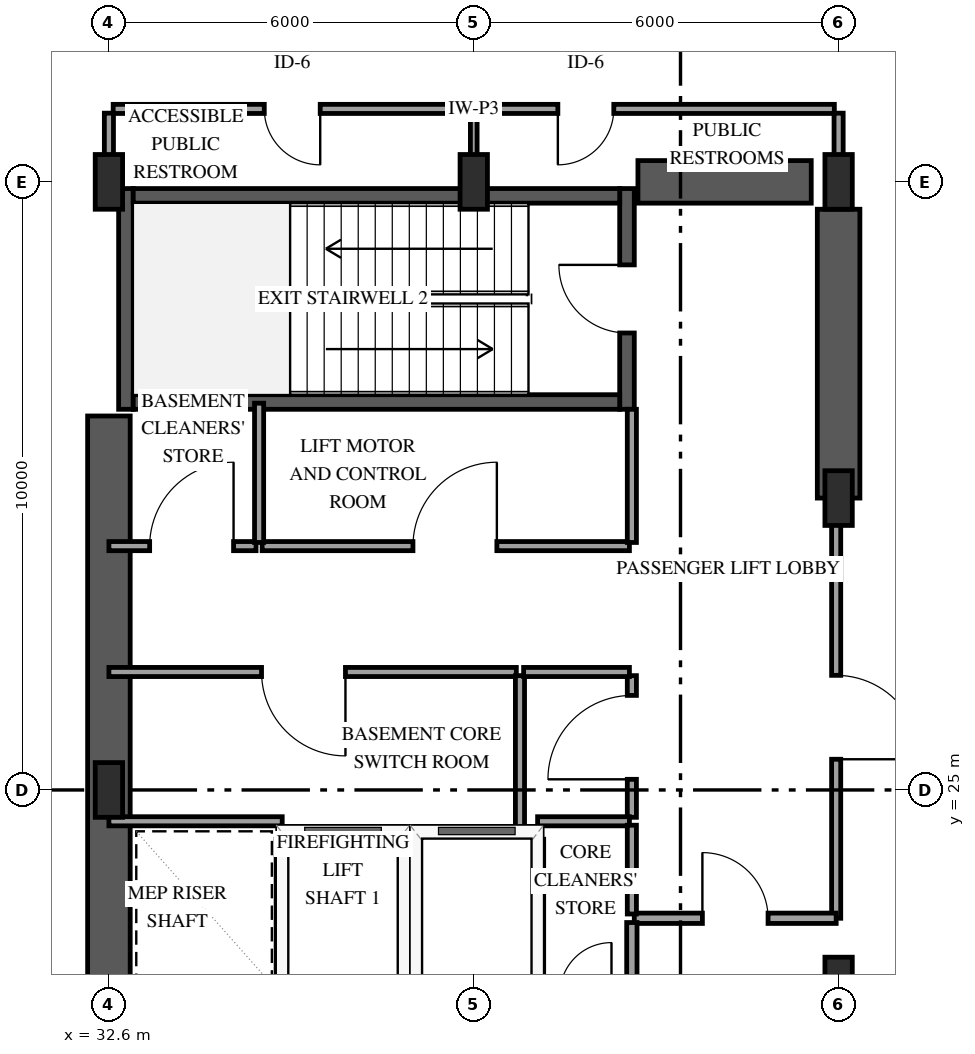
"""IFC4 building model, lengths in metres.
Left out: names, types, materials, properties, quantities, classifications, styles, units other than length and angle.
Written with IfcOpenShell. Run it as: python <this file> out.ifc"""

import sys

from ifc_helpers import new_model, si_unit, direction, frame, frame_2d, origin, origin_2d, place, context, subcontext, project, spatial, rectangle, extrude, element, fill, save


model = new_model("IFC4")
c1 = context("Model", 3, precision=1e-05, world=origin(), true_north=direction((0.0, 1.0)))
c2 = subcontext(c1, "Body", "Model", "MODEL_VIEW")
j1 = project(units=[si_unit("LENGTHUNIT", "METRE"), si_unit("PLANEANGLEUNIT", "RADIAN")], contexts=[c1])
p1 = place(None, origin())
s1 = spatial("IfcSite", under=j1, at=p1, CompositionType="ELEMENT")
p2 = place(p1, origin())
s2 = spatial("IfcBuilding", under=s1, at=p2, CompositionType="ELEMENT")
p3 = place(p2, frame((0.0, 0.0, -5.4)))
s3 = spatial("IfcBuildingStorey", under=s2, at=p3, CompositionType="ELEMENT", Elevation=-5.4)
p4 = place(p3, frame((32.88, 31.26, 0.0), z_axis=(0.0, 0.0, 1.0), x_axis=(0.0, 1.0, 0.0)))
e1 = element("IfcWall", 1, at=p4, inside=s3, PredefinedType="SHEAR", context=c2, shape_type="SweptSolid", body=[
    extrude(rectangle(XDim=3.63, YDim=0.24, at=frame_2d((1.815, 0.0))), origin(), (0.0, 0.0, 1.0), 5.4),
])
p5 = place(p3, frame((41.12, 31.26, 0.0), z_axis=(0.0, 0.0, 1.0), x_axis=(0.0, 1.0, 0.0)))
e2 = element("IfcWall", 2, at=p5, inside=s3, PredefinedType="SHEAR", context=c2, shape_type="SweptSolid", body=[
    extrude(rectangle(XDim=3.63, YDim=0.24, at=frame_2d((1.815, 0.0))), origin(), (0.0, 0.0, 1.0), 5.4),
])
p6 = place(p5, frame((1.255, 0.0, 0.0)))
e3 = element("IfcOpeningElement", 3, at=p6, cuts=e2, PredefinedType="OPENING", context=c2, shape_type="SweptSolid", body=[
    extrude(rectangle(XDim=1.12, YDim=2.15, at=frame_2d((0.56, 1.075))), frame((0.0, 0.13, 0.0), z_axis=(0.0, -1.0, 0.0), x_axis=(1.0, 0.0, 0.0)), (0.0, 0.0, 1.0), 0.26),
])
for number, where, z_axis, x_axis in (
    (4, (33.0, 31.38, 0.0), (0.0, 0.0, 1.0), (1.0, 0.0, 0.0)),
    (5, (33.0, 34.77, 0.0), (0.0, 0.0, 1.0), (1.0, 0.0, 0.0)),
):
    element("IfcWall", number, at=place(p3, frame(where, z_axis=z_axis, x_axis=x_axis)), inside=s3, PredefinedType="SHEAR", context=c2, shape_type="SweptSolid", body=[
        extrude(rectangle(XDim=8.0, YDim=0.24, at=frame_2d((4.0, 0.0))), origin(), (0.0, 0.0, 1.0), 5.4),
    ])
p7 = place(p3, frame((32.6, 18.85, 0.0), z_axis=(0.0, 0.0, 1.0), x_axis=(0.0, 1.0, 0.0)))
e6 = element("IfcWall", 6, at=p7, inside=s3, PredefinedType="SHEAR", context=c2, shape_type="SweptSolid", body=[
    extrude(rectangle(XDim=12.3, YDim=0.7, at=frame_2d((6.15, 0.0))), origin(), (0.0, 0.0, 1.0), 5.4),
])
p8 = place(p3, frame((41.3, 35.0, 0.0), z_axis=(0.0, 0.0, 1.0), x_axis=(1.0, 0.0, 0.0)))
e7 = element("IfcWall", 7, at=p8, inside=s3, PredefinedType="SHEAR", context=c2, shape_type="SweptSolid", body=[
    extrude(rectangle(XDim=2.85, YDim=0.7, at=frame_2d((1.425, 0.0))), origin(), (0.0, 0.0, 1.0), 5.4),
])
p9 = place(p3, frame((44.6, 29.8, 0.0), z_axis=(0.0, 0.0, 1.0), x_axis=(0.0, 1.0, 0.0)))
e8 = element("IfcWall", 8, at=p9, inside=s3, PredefinedType="SHEAR", context=c2, shape_type="SweptSolid", body=[
    extrude(rectangle(XDim=4.75, YDim=0.7, at=frame_2d((2.375, 0.0))), origin(), (0.0, 0.0, 1.0), 5.4),
])
for number, where, z_axis, x_axis in (
    (9, (32.6, 25.0, 0.0), (0.0, 0.0, 1.0), (1.0, 0.0, 0.0)),
    (10, (32.6, 35.0, 0.0), (0.0, 0.0, 1.0), (1.0, 0.0, 0.0)),
    (11, (38.6, 35.0, 0.0), (0.0, 0.0, 1.0), (1.0, 0.0, 0.0)),
    (12, (44.6, 21.8, 0.0), (0.0, 0.0, 1.0), (1.0, 0.0, 0.0)),
    (13, (44.6, 29.8, 0.0), (0.0, 0.0, 1.0), (1.0, 0.0, 0.0)),
    (14, (44.6, 35.0, 0.0), (0.0, 0.0, 1.0), (1.0, 0.0, 0.0)),
):
    element("IfcColumn", number, at=place(p3, frame(where, z_axis=z_axis, x_axis=x_axis)), inside=s3, PredefinedType="PILASTER", context=c2, shape_type="SweptSolid", body=[
        extrude(rectangle(XDim=0.45, YDim=0.9, at=origin_2d()), origin(), (0.0, 0.0, 1.0), 5.4),
    ])
p10 = place(p3, frame((35.45, 24.3, 0.0), z_axis=(0.0, 0.0, 1.0), x_axis=(1.0, 0.0, 0.0)))
e15 = element("IfcWall", 15, at=p10, inside=s3, PredefinedType="SOLIDWALL", context=c2, shape_type="SweptSolid", body=[
    extrude(rectangle(XDim=2.0, YDim=0.2, at=frame_2d((1.0, 0.0))), origin(), (0.0, 0.0, 1.0), 5.08),
])
for number, where, z_axis, x_axis in (
    (16, (35.45, 21.81, 0.0), (0.0, 0.0, 1.0), (0.0, 1.0, 0.0)),
    (17, (37.45, 21.81, 0.0), (0.0, 0.0, 1.0), (0.0, 1.0, 0.0)),
):
    element("IfcWall", number, at=place(p3, frame(where, z_axis=z_axis, x_axis=x_axis)), inside=s3, PredefinedType="SOLIDWALL", context=c2, shape_type="SweptSolid", body=[
        extrude(rectangle(XDim=2.38, YDim=0.2, at=frame_2d((1.19, 0.0))), origin(), (0.0, 0.0, 1.0), 5.08),
    ])
p11 = place(p3, frame((37.65, 24.3, 0.0), z_axis=(0.0, 0.0, 1.0), x_axis=(1.0, 0.0, 0.0)))
e18 = element("IfcWall", 18, at=p11, inside=s3, PredefinedType="SOLIDWALL", context=c2, shape_type="SweptSolid", body=[
    extrude(rectangle(XDim=2.0, YDim=0.2, at=frame_2d((1.0, 0.0))), origin(), (0.0, 0.0, 1.0), 5.08),
])
p12 = place(p3, frame((39.65, 21.81, 0.0), z_axis=(0.0, 0.0, 1.0), x_axis=(0.0, 1.0, 0.0)))
e19 = element("IfcWall", 19, at=p12, inside=s3, PredefinedType="SOLIDWALL", context=c2, shape_type="SweptSolid", body=[
    extrude(rectangle(XDim=2.38, YDim=0.2, at=frame_2d((1.19, 0.0))), origin(), (0.0, 0.0, 1.0), 5.08),
])
p13 = place(p3, frame((44.56, 29.8, 0.0), z_axis=(0.0, 0.0, 1.0), x_axis=(0.0, -1.0, 0.0)))
e20 = element("IfcWall", 20, at=p13, inside=s3, PredefinedType="PARTITIONING", context=c2, shape_type="SweptSolid", body=[
    extrude(rectangle(XDim=6.91, YDim=0.15, at=frame_2d((3.455, 0.0))), origin(), (0.0, 0.0, 1.0), 4.12),
])
p14 = place(p13, frame((2.915, 0.0, 0.0)))
e21 = element("IfcOpeningElement", 21, at=p14, cuts=e20, PredefinedType="OPENING", context=c2, shape_type="SweptSolid", body=[
    extrude(rectangle(XDim=1.38, YDim=2.2, at=frame_2d((0.69, 1.1))), frame((0.0, 0.085, 0.0), z_axis=(0.0, -1.0, 0.0), x_axis=(1.0, 0.0, 0.0)), (0.0, 0.0, 1.0), 0.17),
])
p15 = place(p3, frame((39.3, 26.94, 0.0), z_axis=(0.0, 0.0, 1.0), x_axis=(-1.0, 0.0, 0.0)))
e22 = element("IfcWall", 22, at=p15, inside=s3, PredefinedType="PARTITIONING", context=c2, shape_type="SweptSolid", body=[
    extrude(rectangle(XDim=6.7, YDim=0.15, at=frame_2d((3.35, 0.0))), origin(), (0.0, 0.0, 1.0), 5.08),
])
p16 = place(p15, frame((2.81, 0.0, 0.0)))
e23 = element("IfcOpeningElement", 23, at=p16, cuts=e22, PredefinedType="OPENING", context=c2, shape_type="SweptSolid", body=[
    extrude(rectangle(XDim=1.38, YDim=2.2, at=frame_2d((0.69, 1.1))), frame((0.0, 0.085, 0.0), z_axis=(0.0, -1.0, 0.0), x_axis=(1.0, 0.0, 0.0)), (0.0, 0.0, 1.0), 0.17),
])
p17 = place(p3, frame((35.12, 29.01, 0.0), z_axis=(0.0, 0.0, 1.0), x_axis=(1.0, 0.0, 0.0)))
e24 = element("IfcWall", 24, at=p17, inside=s3, PredefinedType="PARTITIONING", context=c2, shape_type="SweptSolid", body=[
    extrude(rectangle(XDim=6.04, YDim=0.15, at=frame_2d((3.02, 0.0))), origin(), (0.0, 0.0, 1.0), 5.08),
])
p18 = place(p17, frame((2.48, 0.0, 0.0)))
e25 = element("IfcOpeningElement", 25, at=p18, cuts=e24, PredefinedType="OPENING", context=c2, shape_type="SweptSolid", body=[
    extrude(rectangle(XDim=1.38, YDim=2.2, at=frame_2d((0.69, 1.1))), frame((0.0, 0.085, 0.0), z_axis=(0.0, -1.0, 0.0), x_axis=(1.0, 0.0, 0.0)), (0.0, 0.0, 1.0), 0.17),
])
p19 = place(p3, frame((38.53, 36.2, 0.0), z_axis=(0.0, 0.0, 1.0), x_axis=(-1.0, 0.0, 0.0)))
e26 = element("IfcWall", 26, at=p19, inside=s3, PredefinedType="PARTITIONING", context=c2, shape_type="SweptSolid", body=[
    extrude(rectangle(XDim=5.86, YDim=0.15, at=frame_2d((2.93, 0.0))), origin(), (0.0, 0.0, 1.0), 5.08),
])
p20 = place(p19, frame((2.455, 0.0, 0.0)))
e27 = element("IfcOpeningElement", 27, at=p20, cuts=e26, PredefinedType="OPENING", context=c2, shape_type="SweptSolid", body=[
    extrude(rectangle(XDim=0.92, YDim=2.12, at=frame_2d((0.46, 1.06))), frame((0.0, 0.085, 0.0), z_axis=(0.0, -1.0, 0.0), x_axis=(1.0, 0.0, 0.0)), (0.0, 0.0, 1.0), 0.17),
])
p21 = place(p3, frame((44.53, 36.2, 0.0), z_axis=(0.0, 0.0, 1.0), x_axis=(-1.0, 0.0, 0.0)))
e28 = element("IfcWall", 28, at=p21, inside=s3, PredefinedType="PARTITIONING", context=c2, shape_type="SweptSolid", body=[
    extrude(rectangle(XDim=5.86, YDim=0.15, at=frame_2d((2.93, 0.0))), origin(), (0.0, 0.0, 1.0), 5.08),
])
p22 = place(p21, frame((3.627, 0.0, 0.0)))
e29 = element("IfcOpeningElement", 29, at=p22, cuts=e28, PredefinedType="OPENING", context=c2, shape_type="SweptSolid", body=[
    extrude(rectangle(XDim=0.92, YDim=2.12, at=frame_2d((0.46, 1.06))), frame((0.0, 0.085, 0.0), z_axis=(0.0, -1.0, 0.0), x_axis=(1.0, 0.0, 0.0)), (0.0, 0.0, 1.0), 0.17),
])
p23 = place(p3, frame((41.24, 22.89, 0.0), z_axis=(0.0, 0.0, 1.0), x_axis=(1.0, 0.0, 0.0)))
e30 = element("IfcWall", 30, at=p23, inside=s3, PredefinedType="PARTITIONING", context=c2, shape_type="SweptSolid", body=[
    extrude(rectangle(XDim=3.32, YDim=0.17, at=frame_2d((1.66, 0.0))), origin(), (0.0, 0.0, 1.0), 5.08),
])
p24 = place(p23, frame((1.12, 0.0, 0.0)))
e31 = element("IfcOpeningElement", 31, at=p24, cuts=e30, PredefinedType="OPENING", context=c2, shape_type="SweptSolid", body=[
    extrude(rectangle(XDim=1.08, YDim=2.15, at=frame_2d((0.54, 1.075))), frame((0.0, 0.095, 0.0), z_axis=(0.0, -1.0, 0.0), x_axis=(1.0, 0.0, 0.0)), (0.0, 0.0, 1.0), 0.19),
])
p25 = place(p3, frame((35.45, 24.485, 0.0), z_axis=(0.0, 0.0, 1.0), x_axis=(-1.0, 0.0, 0.0)))
e32 = element("IfcWall", 32, at=p25, inside=s3, PredefinedType="PARTITIONING", context=c2, shape_type="SweptSolid", body=[
    extrude(rectangle(XDim=2.85, YDim=0.15, at=frame_2d((1.425, 0.0))), origin(), (0.0, 0.0, 1.0), 5.08),
])
p26 = place(p3, frame((39.36, 24.3, 0.0), z_axis=(0.0, 0.0, 1.0), x_axis=(0.0, 1.0, 0.0)))
e33 = element("IfcWall", 33, at=p26, inside=s3, PredefinedType="PARTITIONING", context=c2, shape_type="SweptSolid", body=[
    extrude(rectangle(XDim=2.58, YDim=0.15, at=frame_2d((1.29, 0.0))), origin(), (0.0, 0.0, 1.0), 5.08),
])
p27 = place(p3, frame((32.6, 29.01, 0.0), z_axis=(0.0, 0.0, 1.0), x_axis=(1.0, 0.0, 0.0)))
e34 = element("IfcWall", 34, at=p27, inside=s3, PredefinedType="PARTITIONING", context=c2, shape_type="SweptSolid", body=[
    extrude(rectangle(XDim=2.42, YDim=0.15, at=frame_2d((1.21, 0.0))), origin(), (0.0, 0.0, 1.0), 5.08),
])
p28 = place(p27, frame((0.67, 0.0, 0.0)))
e35 = element("IfcOpeningElement", 35, at=p28, cuts=e34, PredefinedType="OPENING", context=c2, shape_type="SweptSolid", body=[
    extrude(rectangle(XDim=1.38, YDim=2.2, at=frame_2d((0.69, 1.1))), frame((0.0, 0.085, 0.0), z_axis=(0.0, -1.0, 0.0), x_axis=(1.0, 0.0, 0.0)), (0.0, 0.0, 1.0), 0.17),
])
p29 = place(p3, frame((41.2, 24.55, 0.0), z_axis=(0.0, 0.0, 1.0), x_axis=(0.0, 1.0, 0.0)))
e36 = element("IfcWall", 36, at=p29, inside=s3, PredefinedType="PARTITIONING", context=c2, shape_type="SweptSolid", body=[
    extrude(rectangle(XDim=2.33, YDim=0.15, at=frame_2d((1.165, 0.0))), origin(), (0.0, 0.0, 1.0), 5.08),
])
p30 = place(p29, frame((0.625, 0.0, 0.0)))
e37 = element("IfcOpeningElement", 37, at=p30, cuts=e36, PredefinedType="OPENING", context=c2, shape_type="SweptSolid", body=[
    extrude(rectangle(XDim=1.38, YDim=2.2, at=frame_2d((0.69, 1.1))), frame((0.0, 0.085, 0.0), z_axis=(0.0, -1.0, 0.0), x_axis=(1.0, 0.0, 0.0)), (0.0, 0.0, 1.0), 0.17),
])
p31 = place(p3, frame((35.07, 29.07, 0.0), z_axis=(0.0, 0.0, 1.0), x_axis=(0.0, 1.0, 0.0)))
e38 = element("IfcWall", 38, at=p31, inside=s3, PredefinedType="PARTITIONING", context=c2, shape_type="SweptSolid", body=[
    extrude(rectangle(XDim=2.29, YDim=0.15, at=frame_2d((1.145, 0.0))), origin(), (0.0, 0.0, 1.0), 5.08),
])
p32 = place(p3, frame((41.2, 29.07, 0.0), z_axis=(0.0, 0.0, 1.0), x_axis=(0.0, 1.0, 0.0)))
e39 = element("IfcWall", 39, at=p32, inside=s3, PredefinedType="PARTITIONING", context=c2, shape_type="SweptSolid", body=[
    extrude(rectangle(XDim=2.19, YDim=0.15, at=frame_2d((1.095, 0.0))), origin(), (0.0, 0.0, 1.0), 5.08),
])
p33 = place(p3, frame((41.16, 26.94, 0.0), z_axis=(0.0, 0.0, 1.0), x_axis=(-1.0, 0.0, 0.0)))
e40 = element("IfcWall", 40, at=p33, inside=s3, PredefinedType="PARTITIONING", context=c2, shape_type="SweptSolid", body=[
    extrude(rectangle(XDim=1.74, YDim=0.15, at=frame_2d((0.87, 0.0))), origin(), (0.0, 0.0, 1.0), 5.08),
])
p34 = place(p3, frame((39.65, 24.485, 0.0), z_axis=(0.0, 0.0, 1.0), x_axis=(1.0, 0.0, 0.0)))
e41 = element("IfcWall", 41, at=p34, inside=s3, PredefinedType="PARTITIONING", context=c2, shape_type="SweptSolid", body=[
    extrude(rectangle(XDim=1.51, YDim=0.15, at=frame_2d((0.755, 0.0))), origin(), (0.0, 0.0, 1.0), 5.08),
])
p35 = place(p3, frame((41.2, 22.96, 0.0), z_axis=(0.0, 0.0, 1.0), x_axis=(0.0, 1.0, 0.0)))
e42 = element("IfcWall", 42, at=p35, inside=s3, PredefinedType="PARTITIONING", context=c2, shape_type="SweptSolid", body=[
    extrude(rectangle(XDim=1.46, YDim=0.15, at=frame_2d((0.73, 0.0))), origin(), (0.0, 0.0, 1.0), 5.08),
])
p36 = place(p3, frame((41.2, 21.7, 0.0), z_axis=(0.0, 0.0, 1.0), x_axis=(0.0, 1.0, 0.0)))
e43 = element("IfcWall", 43, at=p36, inside=s3, PredefinedType="PARTITIONING", context=c2, shape_type="SweptSolid", body=[
    extrude(rectangle(XDim=1.12, YDim=0.17, at=frame_2d((0.56, 0.0))), origin(), (0.0, 0.0, 1.0), 5.08),
])
for number, where, z_axis, x_axis in (
    (44, (32.6, 36.13, 0.0), (0.0, 0.0, 1.0), (0.0, -1.0, 0.0)),
    (45, (44.6, 35.07, 0.0), (0.0, 0.0, 1.0), (0.0, 1.0, 0.0)),
):
    element("IfcWall", number, at=place(p3, frame(where, z_axis=z_axis, x_axis=x_axis)), inside=s3, PredefinedType="PARTITIONING", context=c2, shape_type="SweptSolid", body=[
        extrude(rectangle(XDim=1.06, YDim=0.15, at=frame_2d((0.53, 0.0))), origin(), (0.0, 0.0, 1.0), 4.202),
    ])
p37 = place(p3, frame((38.6, 36.13, 0.0), z_axis=(0.0, 0.0, 1.0), x_axis=(0.0, -1.0, 0.0)))
e46 = element("IfcWall", 46, at=p37, inside=s3, PredefinedType="PARTITIONING", context=c2, shape_type="SweptSolid", body=[
    extrude(rectangle(XDim=1.06, YDim=0.11, at=frame_2d((0.53, 0.0))), origin(), (0.0, 0.0, 1.0), 5.08),
])
p38 = place(p6, origin())
e47 = element("IfcDoor", 47, at=p38, inside=s3, OperationType="SINGLE_SWING_RIGHT", PredefinedType="DOOR", context=c2, shape_type="SweptSolid", body=[
    extrude(rectangle(XDim=1.12, YDim=2.15, at=frame_2d((0.56, 1.075))), frame((0.0, 0.025, 0.0), z_axis=(0.0, -1.0, 0.0), x_axis=(1.0, 0.0, 0.0)), (0.0, 0.0, 1.0), 0.05),
])
fill(e3, e47)
p39 = place(p14, origin())
e48 = element("IfcDoor", 48, at=p39, inside=s3, OperationType="SINGLE_SWING_RIGHT", PredefinedType="DOOR", context=c2, shape_type="SweptSolid", body=[
    extrude(rectangle(XDim=1.38, YDim=2.2, at=frame_2d((0.69, 1.1))), frame((0.0, 0.025, 0.0), z_axis=(0.0, -1.0, 0.0), x_axis=(1.0, 0.0, 0.0)), (0.0, 0.0, 1.0), 0.05),
])
fill(e21, e48)
p40 = place(p16, origin())
e49 = element("IfcDoor", 49, at=p40, inside=s3, OperationType="SINGLE_SWING_LEFT", PredefinedType="DOOR", context=c2, shape_type="SweptSolid", body=[
    extrude(rectangle(XDim=1.38, YDim=2.2, at=frame_2d((0.69, 1.1))), frame((0.0, 0.025, 0.0), z_axis=(0.0, -1.0, 0.0), x_axis=(1.0, 0.0, 0.0)), (0.0, 0.0, 1.0), 0.05),
])
fill(e23, e49)
p41 = place(p18, origin())
e50 = element("IfcDoor", 50, at=p41, inside=s3, OperationType="SINGLE_SWING_RIGHT", PredefinedType="DOOR", context=c2, shape_type="SweptSolid", body=[
    extrude(rectangle(XDim=1.38, YDim=2.2, at=frame_2d((0.69, 1.1))), frame((0.0, 0.025, 0.0), z_axis=(0.0, -1.0, 0.0), x_axis=(1.0, 0.0, 0.0)), (0.0, 0.0, 1.0), 0.05),
])
fill(e25, e50)
p42 = place(p20, origin())
e51 = element("IfcDoor", 51, at=p42, inside=s3, OperationType="SINGLE_SWING_LEFT", PredefinedType="DOOR", context=c2, shape_type="SweptSolid", body=[
    extrude(rectangle(XDim=0.92, YDim=2.12, at=frame_2d((0.46, 1.06))), frame((0.0, 0.025, 0.0), z_axis=(0.0, -1.0, 0.0), x_axis=(1.0, 0.0, 0.0)), (0.0, 0.0, 1.0), 0.05),
])
fill(e27, e51)
p43 = place(p22, origin())
e52 = element("IfcDoor", 52, at=p43, inside=s3, OperationType="SINGLE_SWING_RIGHT", PredefinedType="DOOR", context=c2, shape_type="SweptSolid", body=[
    extrude(rectangle(XDim=0.92, YDim=2.12, at=frame_2d((0.46, 1.06))), frame((0.0, 0.025, 0.0), z_axis=(0.0, -1.0, 0.0), x_axis=(1.0, 0.0, 0.0)), (0.0, 0.0, 1.0), 0.05),
])
fill(e29, e52)
p44 = place(p24, origin())
e53 = element("IfcDoor", 53, at=p44, inside=s3, OperationType="SINGLE_SWING_LEFT", PredefinedType="DOOR", context=c2, shape_type="SweptSolid", body=[
    extrude(rectangle(XDim=1.08, YDim=2.15, at=frame_2d((0.54, 1.075))), frame((0.0, 0.025, 0.0), z_axis=(0.0, -1.0, 0.0), x_axis=(1.0, 0.0, 0.0)), (0.0, 0.0, 1.0), 0.05),
])
fill(e31, e53)
p45 = place(p28, origin())
e54 = element("IfcDoor", 54, at=p45, inside=s3, OperationType="SINGLE_SWING_RIGHT", PredefinedType="DOOR", context=c2, shape_type="SweptSolid", body=[
    extrude(rectangle(XDim=1.38, YDim=2.2, at=frame_2d((0.69, 1.1))), frame((0.0, 0.025, 0.0), z_axis=(0.0, -1.0, 0.0), x_axis=(1.0, 0.0, 0.0)), (0.0, 0.0, 1.0), 0.05),
])
fill(e35, e54)
p46 = place(p30, origin())
e55 = element("IfcDoor", 55, at=p46, inside=s3, OperationType="SINGLE_SWING_LEFT", PredefinedType="DOOR", context=c2, shape_type="SweptSolid", body=[
    extrude(rectangle(XDim=1.38, YDim=2.2, at=frame_2d((0.69, 1.1))), frame((0.0, 0.025, 0.0), z_axis=(0.0, -1.0, 0.0), x_axis=(1.0, 0.0, 0.0)), (0.0, 0.0, 1.0), 0.05),
])
fill(e37, e55)
save(model, sys.argv[1])
